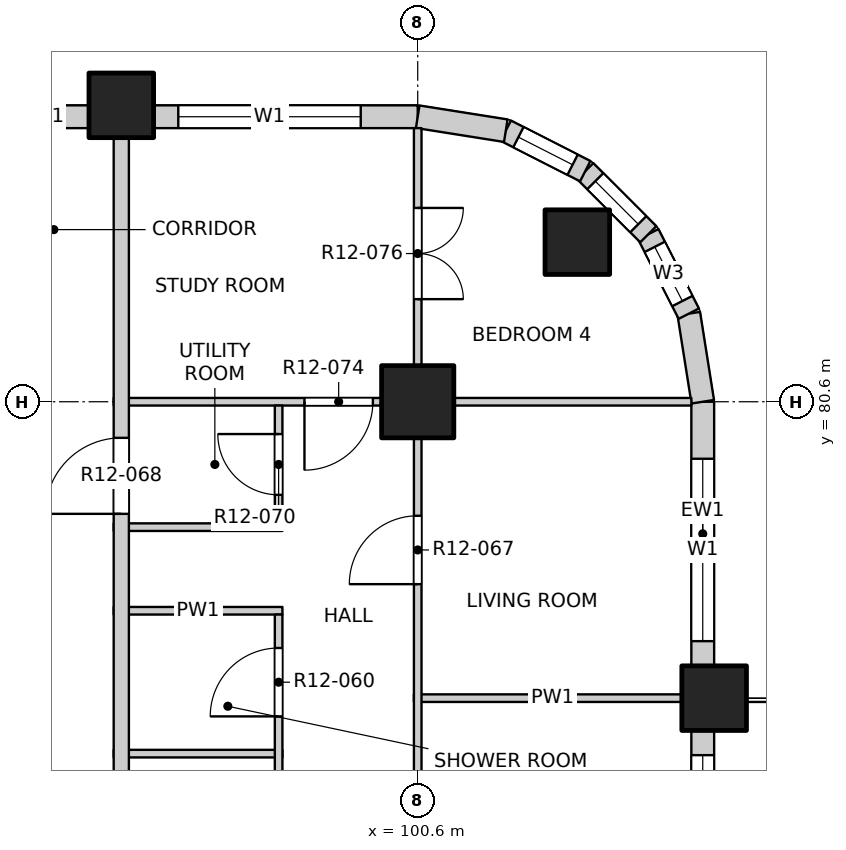
"""IFC4 building model, lengths in metres.
Left out: names, types, materials, properties, quantities, classifications, styles, units other than length and angle.
Written with IfcOpenShell. Run it as: python <this file> out.ifc"""

import sys

from ifc_helpers import new_model, si_unit, direction, frame, frame_2d, origin, origin_2d, place, context, subcontext, project, spatial, rectangle, extrude, element, fill, save


model = new_model("IFC4")
c1 = context("Model", 3, precision=1e-05, world=origin(), true_north=direction((0.0, 1.0)))
c2 = subcontext(c1, "Body", "Model", "MODEL_VIEW")
j1 = project(units=[si_unit("LENGTHUNIT", "METRE"), si_unit("PLANEANGLEUNIT", "RADIAN")], contexts=[c1])
p1 = place(None, origin())
s1 = spatial("IfcSite", under=j1, at=p1, CompositionType="ELEMENT")
p2 = place(p1, origin())
s2 = spatial("IfcBuilding", under=s1, at=p2, CompositionType="ELEMENT")
p3 = place(p2, frame((0.0, 0.0, 137.3)))
s3 = spatial("IfcBuildingStorey", under=s2, at=p3, CompositionType="ELEMENT", Elevation=137.3)
for number, where, z_axis, x_axis in (
    (1, (102.7, 82.7, -0.25), (0.0, 0.0, 1.0), (1.0, 0.0, 0.0)),
    (2, (104.5, 76.7, -0.25), (0.0, 0.0, 1.0), (1.0, 0.0, 0.0)),
    (3, (96.7, 84.5, -0.25), (0.0, 0.0, 1.0), (1.0, 0.0, 0.0)),
):
    element("IfcColumn", number, at=place(p3, frame(where, z_axis=z_axis, x_axis=x_axis)), inside=s3, PredefinedType="COLUMN", context=c2, shape_type="SweptSolid", body=[
        extrude(rectangle(XDim=0.85, YDim=0.85, at=origin_2d()), origin(), (0.0, 0.0, 1.0), 3.4),
    ])
p4 = place(p3, frame((100.6, 80.6, -0.25), z_axis=(0.0, 0.0, 1.0), x_axis=(1.0, 0.0, 0.0)))
e4 = element("IfcColumn", 4, at=p4, inside=s3, PredefinedType="COLUMN", context=c2, shape_type="SweptSolid", body=[
    extrude(rectangle(XDim=0.95, YDim=0.95, at=origin_2d()), origin(), (0.0, 0.0, 1.0), 3.4),
])
p5 = place(p3, frame((104.35, 69.325, 0.0), z_axis=(0.0, 0.0, 1.0), x_axis=(0.0, 1.0, 0.0)))
e5 = element("IfcWall", 5, at=p5, inside=s3, PredefinedType="SOLIDWALL", context=c2, shape_type="SweptSolid", body=[
    extrude(rectangle(XDim=6.95, YDim=0.3, at=frame_2d((3.475, 0.0))), origin(), (0.0, 0.0, 1.0), 2.7),
])
p6 = place(p5, frame((0.625, 0.0, 0.0)))
e6 = element("IfcOpeningElement", 6, at=p6, cuts=e5, PredefinedType="OPENING", context=c2, shape_type="SweptSolid", body=[
    extrude(rectangle(XDim=1.8, YDim=2.4, at=frame_2d((0.9, 1.2))), frame((0.0, 0.16, 0.0), z_axis=(0.0, -1.0, 0.0), x_axis=(1.0, 0.0, 0.0)), (0.0, 0.0, 1.0), 0.32),
])
p7 = place(p5, frame((4.225, 0.0, 0.9)))
e7 = element("IfcOpeningElement", 7, at=p7, cuts=e5, PredefinedType="OPENING", context=c2, shape_type="SweptSolid", body=[
    extrude(rectangle(XDim=2.4, YDim=1.8, at=frame_2d((1.2, 0.9))), frame((0.0, 0.16, 0.0), z_axis=(0.0, -1.0, 0.0), x_axis=(1.0, 0.0, 0.0)), (0.0, 0.0, 1.0), 0.32),
])
p8 = place(p3, frame((104.35, 77.125, 0.0), z_axis=(0.0, 0.0, 1.0), x_axis=(0.0, 1.0, 0.0)))
e8 = element("IfcWall", 8, at=p8, inside=s3, PredefinedType="SOLIDWALL", context=c2, shape_type="SweptSolid", body=[
    extrude(rectangle(XDim=3.475, YDim=0.3, at=frame_2d((1.738, 0.0))), origin(), (0.0, 0.0, 1.0), 2.7),
])
p9 = place(p8, frame((0.325, 0.0, 0.9)))
e9 = element("IfcOpeningElement", 9, at=p9, cuts=e8, PredefinedType="OPENING", context=c2, shape_type="SweptSolid", body=[
    extrude(rectangle(XDim=2.4, YDim=1.8, at=frame_2d((1.2, 0.9))), frame((0.0, 0.16, 0.0), z_axis=(0.0, -1.0, 0.0), x_axis=(1.0, 0.0, 0.0)), (0.0, 0.0, 1.0), 0.32),
])
p10 = place(p3, frame((95.025, 84.35, 0.0), z_axis=(0.0, 0.0, 1.0), x_axis=(1.0, 0.0, 0.0)))
e10 = element("IfcWall", 10, at=p10, inside=s3, PredefinedType="SOLIDWALL", context=c2, shape_type="SweptSolid", body=[
    extrude(rectangle(XDim=1.25, YDim=0.3, at=frame_2d((0.625, 0.0))), origin(), (0.0, 0.0, 1.0), 2.7),
])
p11 = place(p3, frame((97.125, 84.35, 0.0), z_axis=(0.0, 0.0, 1.0), x_axis=(1.0, 0.0, 0.0)))
e11 = element("IfcWall", 11, at=p11, inside=s3, PredefinedType="SOLIDWALL", context=c2, shape_type="SweptSolid", body=[
    extrude(rectangle(XDim=3.475, YDim=0.3, at=frame_2d((1.738, 0.0))), origin(), (0.0, 0.0, 1.0), 2.7),
])
p12 = place(p11, frame((0.325, 0.0, 0.9)))
e12 = element("IfcOpeningElement", 12, at=p12, cuts=e11, PredefinedType="OPENING", context=c2, shape_type="SweptSolid", body=[
    extrude(rectangle(XDim=2.4, YDim=1.8, at=frame_2d((1.2, 0.9))), frame((0.0, 0.16, 0.0), z_axis=(0.0, -1.0, 0.0), x_axis=(1.0, 0.0, 0.0)), (0.0, 0.0, 1.0), 0.32),
])
p13 = place(p3, frame((104.35, 80.6, 0.0), z_axis=(0.0, 0.0, 1.0), x_axis=(-0.156496880861, 0.987678452879, 0.0)))
e13 = element("IfcWall", 13, at=p13, inside=s3, PredefinedType="SOLIDWALL", context=c2, shape_type="SweptSolid", body=[
    extrude(rectangle(XDim=1.173, YDim=0.3, at=frame_2d((0.586, 0.0))), origin(), (0.0, 0.0, 1.0), 2.7),
])
p14 = place(p3, frame((104.167, 81.759, 0.0), z_axis=(0.0, 0.0, 1.0), x_axis=(-0.454025524128, 0.890988677504, 0.0)))
e14 = element("IfcWall", 14, at=p14, inside=s3, PredefinedType="SOLIDWALL", context=c2, shape_type="SweptSolid", body=[
    extrude(rectangle(XDim=1.173, YDim=0.3, at=frame_2d((0.587, 0.0))), origin(), (0.0, 0.0, 1.0), 2.7),
])
p15 = place(p14, frame((0.187, 0.0, 0.9)))
e15 = element("IfcOpeningElement", 15, at=p15, cuts=e14, PredefinedType="OPENING", context=c2, shape_type="SweptSolid", body=[
    extrude(rectangle(XDim=0.8, YDim=1.2, at=frame_2d((0.4, 0.6))), frame((0.0, 0.16, 0.0), z_axis=(0.0, -1.0, 0.0), x_axis=(1.0, 0.0, 0.0)), (0.0, 0.0, 1.0), 0.32),
])
p16 = place(p3, frame((103.634, 82.804, 0.0), z_axis=(0.0, 0.0, 1.0), x_axis=(-0.707106781187, 0.707106781187, 0.0)))
e16 = element("IfcWall", 16, at=p16, inside=s3, PredefinedType="SOLIDWALL", context=c2, shape_type="SweptSolid", body=[
    extrude(rectangle(XDim=1.173, YDim=0.3, at=frame_2d((0.586, 0.0))), origin(), (0.0, 0.0, 1.0), 2.7),
])
p17 = place(p16, frame((0.187, 0.0, 0.9)))
e17 = element("IfcOpeningElement", 17, at=p17, cuts=e16, PredefinedType="OPENING", context=c2, shape_type="SweptSolid", body=[
    extrude(rectangle(XDim=0.8, YDim=1.2, at=frame_2d((0.4, 0.6))), frame((0.0, 0.16, 0.0), z_axis=(0.0, -1.0, 0.0), x_axis=(1.0, 0.0, 0.0)), (0.0, 0.0, 1.0), 0.32),
])
p18 = place(p3, frame((102.804, 83.634, 0.0), z_axis=(0.0, 0.0, 1.0), x_axis=(-0.890988677504, 0.454025524128, 0.0)))
e18 = element("IfcWall", 18, at=p18, inside=s3, PredefinedType="SOLIDWALL", context=c2, shape_type="SweptSolid", body=[
    extrude(rectangle(XDim=1.173, YDim=0.3, at=frame_2d((0.587, 0.0))), origin(), (0.0, 0.0, 1.0), 2.7),
])
p19 = place(p18, frame((0.187, 0.0, 0.9)))
e19 = element("IfcOpeningElement", 19, at=p19, cuts=e18, PredefinedType="OPENING", context=c2, shape_type="SweptSolid", body=[
    extrude(rectangle(XDim=0.8, YDim=1.2, at=frame_2d((0.4, 0.6))), frame((0.0, 0.16, 0.0), z_axis=(0.0, -1.0, 0.0), x_axis=(1.0, 0.0, 0.0)), (0.0, 0.0, 1.0), 0.32),
])
p20 = place(p3, frame((101.759, 84.167, 0.0), z_axis=(0.0, 0.0, 1.0), x_axis=(-0.987678452879, 0.156496880861, 0.0)))
e20 = element("IfcWall", 20, at=p20, inside=s3, PredefinedType="SOLIDWALL", context=c2, shape_type="SweptSolid", body=[
    extrude(rectangle(XDim=1.173, YDim=0.3, at=frame_2d((0.586, 0.0))), origin(), (0.0, 0.0, 1.0), 2.7),
])
p21 = place(p3, frame((96.6, 75.97, 0.0), z_axis=(0.0, 0.0, 1.0), x_axis=(1.0, 0.0, 0.0)))
e21 = element("IfcWall", 21, at=p21, inside=s3, PredefinedType="PARTITIONING", context=c2, shape_type="SweptSolid", body=[
    extrude(rectangle(XDim=2.22, YDim=0.1, at=frame_2d((1.11, 0.0))), origin(), (0.0, 0.0, 1.0), 3.15),
])
p22 = place(p3, frame((100.55, 76.7, 0.0), z_axis=(0.0, 0.0, 1.0), x_axis=(1.0, 0.0, 0.0)))
e22 = element("IfcWall", 22, at=p22, inside=s3, PredefinedType="PARTITIONING", context=c2, shape_type="SweptSolid", body=[
    extrude(rectangle(XDim=3.65, YDim=0.1, at=frame_2d((1.825, 0.0))), origin(), (0.0, 0.0, 1.0), 2.55),
])
for number, where, z_axis, x_axis in (
    (23, (96.6, 77.85, 0.0), (0.0, 0.0, 1.0), (1.0, 0.0, 0.0)),
    (24, (96.6, 78.95, 0.0), (0.0, 0.0, 1.0), (1.0, 0.0, 0.0)),
):
    element("IfcWall", number, at=place(p3, frame(where, z_axis=z_axis, x_axis=x_axis)), inside=s3, PredefinedType="PARTITIONING", context=c2, shape_type="SweptSolid", body=[
        extrude(rectangle(XDim=2.22, YDim=0.1, at=frame_2d((1.11, 0.0))), origin(), (0.0, 0.0, 1.0), 3.15),
    ])
p23 = place(p3, frame((96.6, 80.6, 0.0), z_axis=(0.0, 0.0, 1.0), x_axis=(1.0, 0.0, 0.0)))
e25 = element("IfcWall", 25, at=p23, inside=s3, PredefinedType="PARTITIONING", context=c2, shape_type="SweptSolid", body=[
    extrude(rectangle(XDim=7.6, YDim=0.1, at=frame_2d((3.8, 0.0))), origin(), (0.0, 0.0, 1.0), 3.15),
])
p24 = place(p23, frame((2.51, 0.0, 0.0)))
e26 = element("IfcOpeningElement", 26, at=p24, cuts=e25, PredefinedType="OPENING", context=c2, shape_type="SweptSolid", body=[
    extrude(rectangle(XDim=0.9, YDim=2.1, at=frame_2d((0.45, 1.05))), frame((0.0, 0.06, 0.0), z_axis=(0.0, -1.0, 0.0), x_axis=(1.0, 0.0, 0.0)), (0.0, 0.0, 1.0), 0.12),
])
p25 = place(p3, frame((96.7, 49.5, 0.0), z_axis=(0.0, 0.0, 1.0), x_axis=(0.0, 1.0, 0.0)))
e27 = element("IfcWall", 27, at=p25, inside=s3, PredefinedType="PARTITIONING", context=c2, shape_type="SweptSolid", body=[
    extrude(rectangle(XDim=34.7, YDim=0.2, at=frame_2d((17.35, 0.0))), origin(), (0.0, 0.0, 1.0), 3.15),
])
p26 = place(p25, frame((13.325, 0.0, 0.0)))
e28 = element("IfcOpeningElement", 28, at=p26, cuts=e27, PredefinedType="OPENING", context=c2, shape_type="SweptSolid", body=[
    extrude(rectangle(XDim=1.0, YDim=2.1, at=frame_2d((0.5, 1.05))), frame((0.0, 0.11, 0.0), z_axis=(0.0, -1.0, 0.0), x_axis=(1.0, 0.0, 0.0)), (0.0, 0.0, 1.0), 0.22),
])
p27 = place(p25, frame((29.625, 0.0, 0.0)))
e29 = element("IfcOpeningElement", 29, at=p27, cuts=e27, PredefinedType="OPENING", context=c2, shape_type="SweptSolid", body=[
    extrude(rectangle(XDim=1.0, YDim=2.1, at=frame_2d((0.5, 1.05))), frame((0.0, 0.11, 0.0), z_axis=(0.0, -1.0, 0.0), x_axis=(1.0, 0.0, 0.0)), (0.0, 0.0, 1.0), 0.22),
])
p28 = place(p3, frame((98.77, 62.7, 0.0), z_axis=(0.0, 0.0, 1.0), x_axis=(0.0, 1.0, 0.0)))
e30 = element("IfcWall", 30, at=p28, inside=s3, PredefinedType="PARTITIONING", context=c2, shape_type="SweptSolid", body=[
    extrude(rectangle(XDim=15.1, YDim=0.1, at=frame_2d((7.55, 0.0))), origin(), (0.0, 0.0, 1.0), 3.15),
])
p29 = place(p28, frame((0.675, 0.0, 0.0)))
e31 = element("IfcOpeningElement", 31, at=p29, cuts=e30, PredefinedType="OPENING", context=c2, shape_type="SweptSolid", body=[
    extrude(rectangle(XDim=0.9, YDim=2.1, at=frame_2d((0.45, 1.05))), frame((0.0, 0.06, 0.0), z_axis=(0.0, -1.0, 0.0), x_axis=(1.0, 0.0, 0.0)), (0.0, 0.0, 1.0), 0.12),
])
p30 = place(p28, frame((3.46, 0.0, 0.0)))
e32 = element("IfcOpeningElement", 32, at=p30, cuts=e30, PredefinedType="OPENING", context=c2, shape_type="SweptSolid", body=[
    extrude(rectangle(XDim=0.9, YDim=2.1, at=frame_2d((0.45, 1.05))), frame((0.0, 0.06, 0.0), z_axis=(0.0, -1.0, 0.0), x_axis=(1.0, 0.0, 0.0)), (0.0, 0.0, 1.0), 0.12),
])
p31 = place(p28, frame((6.27, 0.0, 0.0)))
e33 = element("IfcOpeningElement", 33, at=p31, cuts=e30, PredefinedType="OPENING", context=c2, shape_type="SweptSolid", body=[
    extrude(rectangle(XDim=0.9, YDim=2.1, at=frame_2d((0.45, 1.05))), frame((0.0, 0.06, 0.0), z_axis=(0.0, -1.0, 0.0), x_axis=(1.0, 0.0, 0.0)), (0.0, 0.0, 1.0), 0.12),
])
p32 = place(p28, frame((8.895, 0.0, 0.0)))
e34 = element("IfcOpeningElement", 34, at=p32, cuts=e30, PredefinedType="OPENING", context=c2, shape_type="SweptSolid", body=[
    extrude(rectangle(XDim=0.8, YDim=2.1, at=frame_2d((0.4, 1.05))), frame((0.0, 0.06, 0.0), z_axis=(0.0, -1.0, 0.0), x_axis=(1.0, 0.0, 0.0)), (0.0, 0.0, 1.0), 0.12),
])
p33 = place(p28, frame((11.57, 0.0, 0.0)))
e35 = element("IfcOpeningElement", 35, at=p33, cuts=e30, PredefinedType="OPENING", context=c2, shape_type="SweptSolid", body=[
    extrude(rectangle(XDim=0.8, YDim=2.1, at=frame_2d((0.4, 1.05))), frame((0.0, 0.06, 0.0), z_axis=(0.0, -1.0, 0.0), x_axis=(1.0, 0.0, 0.0)), (0.0, 0.0, 1.0), 0.12),
])
p34 = place(p28, frame((13.76, 0.0, 0.0)))
e36 = element("IfcOpeningElement", 36, at=p34, cuts=e30, PredefinedType="OPENING", context=c2, shape_type="SweptSolid", body=[
    extrude(rectangle(XDim=0.9, YDim=2.1, at=frame_2d((0.45, 1.05))), frame((0.0, 0.06, 0.0), z_axis=(0.0, -1.0, 0.0), x_axis=(1.0, 0.0, 0.0)), (0.0, 0.0, 1.0), 0.12),
])
p35 = place(p3, frame((98.77, 79.0, 0.0), z_axis=(0.0, 0.0, 1.0), x_axis=(0.0, 1.0, 0.0)))
e37 = element("IfcWall", 37, at=p35, inside=s3, PredefinedType="PARTITIONING", context=c2, shape_type="SweptSolid", body=[
    extrude(rectangle(XDim=1.55, YDim=0.1, at=frame_2d((0.775, 0.0))), origin(), (0.0, 0.0, 1.0), 3.15),
])
p36 = place(p35, frame((0.375, 0.0, 0.0)))
e38 = element("IfcOpeningElement", 38, at=p36, cuts=e37, PredefinedType="OPENING", context=c2, shape_type="SweptSolid", body=[
    extrude(rectangle(XDim=0.8, YDim=2.1, at=frame_2d((0.4, 1.05))), frame((0.0, 0.06, 0.0), z_axis=(0.0, -1.0, 0.0), x_axis=(1.0, 0.0, 0.0)), (0.0, 0.0, 1.0), 0.12),
])
p37 = place(p3, frame((100.6, 45.8, 0.0), z_axis=(0.0, 0.0, 1.0), x_axis=(0.0, 1.0, 0.0)))
e39 = element("IfcWall", 39, at=p37, inside=s3, PredefinedType="PARTITIONING", context=c2, shape_type="SweptSolid", body=[
    extrude(rectangle(XDim=38.4, YDim=0.1, at=frame_2d((19.2, 0.0))), origin(), (0.0, 0.0, 1.0), 3.15),
])
p38 = place(p37, frame((1.05, 0.0, 0.0)))
e40 = element("IfcOpeningElement", 40, at=p38, cuts=e39, PredefinedType="OPENING", context=c2, shape_type="SweptSolid", body=[
    extrude(rectangle(XDim=1.2, YDim=2.1, at=frame_2d((0.6, 1.05))), frame((0.0, 0.06, 0.0), z_axis=(0.0, -1.0, 0.0), x_axis=(1.0, 0.0, 0.0)), (0.0, 0.0, 1.0), 0.12),
])
p39 = place(p37, frame((5.1, 0.0, 0.0)))
e41 = element("IfcOpeningElement", 41, at=p39, cuts=e39, PredefinedType="OPENING", context=c2, shape_type="SweptSolid", body=[
    extrude(rectangle(XDim=0.9, YDim=2.1, at=frame_2d((0.45, 1.05))), frame((0.0, 0.06, 0.0), z_axis=(0.0, -1.0, 0.0), x_axis=(1.0, 0.0, 0.0)), (0.0, 0.0, 1.0), 0.12),
])
p40 = place(p37, frame((9.0, 0.0, 0.0)))
e42 = element("IfcOpeningElement", 42, at=p40, cuts=e39, PredefinedType="OPENING", context=c2, shape_type="SweptSolid", body=[
    extrude(rectangle(XDim=0.9, YDim=2.1, at=frame_2d((0.45, 1.05))), frame((0.0, 0.06, 0.0), z_axis=(0.0, -1.0, 0.0), x_axis=(1.0, 0.0, 0.0)), (0.0, 0.0, 1.0), 0.12),
])
p41 = place(p37, frame((12.9, 0.0, 0.0)))
e43 = element("IfcOpeningElement", 43, at=p41, cuts=e39, PredefinedType="OPENING", context=c2, shape_type="SweptSolid", body=[
    extrude(rectangle(XDim=0.9, YDim=2.1, at=frame_2d((0.45, 1.05))), frame((0.0, 0.06, 0.0), z_axis=(0.0, -1.0, 0.0), x_axis=(1.0, 0.0, 0.0)), (0.0, 0.0, 1.0), 0.12),
])
p42 = place(p37, frame((16.8, 0.0, 0.0)))
e44 = element("IfcOpeningElement", 44, at=p42, cuts=e39, PredefinedType="OPENING", context=c2, shape_type="SweptSolid", body=[
    extrude(rectangle(XDim=0.9, YDim=2.1, at=frame_2d((0.45, 1.05))), frame((0.0, 0.06, 0.0), z_axis=(0.0, -1.0, 0.0), x_axis=(1.0, 0.0, 0.0)), (0.0, 0.0, 1.0), 0.12),
])
p43 = place(p37, frame((20.7, 0.0, 0.0)))
e45 = element("IfcOpeningElement", 45, at=p43, cuts=e39, PredefinedType="OPENING", context=c2, shape_type="SweptSolid", body=[
    extrude(rectangle(XDim=0.9, YDim=2.1, at=frame_2d((0.45, 1.05))), frame((0.0, 0.06, 0.0), z_axis=(0.0, -1.0, 0.0), x_axis=(1.0, 0.0, 0.0)), (0.0, 0.0, 1.0), 0.12),
])
p44 = place(p37, frame((24.6, 0.0, 0.0)))
e46 = element("IfcOpeningElement", 46, at=p44, cuts=e39, PredefinedType="OPENING", context=c2, shape_type="SweptSolid", body=[
    extrude(rectangle(XDim=0.9, YDim=2.1, at=frame_2d((0.45, 1.05))), frame((0.0, 0.06, 0.0), z_axis=(0.0, -1.0, 0.0), x_axis=(1.0, 0.0, 0.0)), (0.0, 0.0, 1.0), 0.12),
])
p45 = place(p37, frame((28.5, 0.0, 0.0)))
e47 = element("IfcOpeningElement", 47, at=p45, cuts=e39, PredefinedType="OPENING", context=c2, shape_type="SweptSolid", body=[
    extrude(rectangle(XDim=0.9, YDim=2.1, at=frame_2d((0.45, 1.05))), frame((0.0, 0.06, 0.0), z_axis=(0.0, -1.0, 0.0), x_axis=(1.0, 0.0, 0.0)), (0.0, 0.0, 1.0), 0.12),
])
p46 = place(p37, frame((32.4, 0.0, 0.0)))
e48 = element("IfcOpeningElement", 48, at=p46, cuts=e39, PredefinedType="OPENING", context=c2, shape_type="SweptSolid", body=[
    extrude(rectangle(XDim=0.9, YDim=2.1, at=frame_2d((0.45, 1.05))), frame((0.0, 0.06, 0.0), z_axis=(0.0, -1.0, 0.0), x_axis=(1.0, 0.0, 0.0)), (0.0, 0.0, 1.0), 0.12),
])
p47 = place(p37, frame((36.15, 0.0, 0.0)))
e49 = element("IfcOpeningElement", 49, at=p47, cuts=e39, PredefinedType="OPENING", context=c2, shape_type="SweptSolid", body=[
    extrude(rectangle(XDim=1.2, YDim=2.1, at=frame_2d((0.6, 1.05))), frame((0.0, 0.06, 0.0), z_axis=(0.0, -1.0, 0.0), x_axis=(1.0, 0.0, 0.0)), (0.0, 0.0, 1.0), 0.12),
])
p48 = place(p7, origin())
e50 = element("IfcWindow", 50, at=p48, inside=s3, PartitioningType="DOUBLE_PANEL_VERTICAL", PredefinedType="WINDOW", context=c2, shape_type="SweptSolid", body=[
    extrude(rectangle(XDim=2.4, YDim=1.8, at=frame_2d((1.2, 0.9))), frame((0.0, 0.03, 0.0), z_axis=(0.0, -1.0, 0.0), x_axis=(1.0, 0.0, 0.0)), (0.0, 0.0, 1.0), 0.06),
])
fill(e7, e50)
p49 = place(p9, origin())
e51 = element("IfcWindow", 51, at=p49, inside=s3, PartitioningType="DOUBLE_PANEL_VERTICAL", PredefinedType="WINDOW", context=c2, shape_type="SweptSolid", body=[
    extrude(rectangle(XDim=2.4, YDim=1.8, at=frame_2d((1.2, 0.9))), frame((0.0, 0.03, 0.0), z_axis=(0.0, -1.0, 0.0), x_axis=(1.0, 0.0, 0.0)), (0.0, 0.0, 1.0), 0.06),
])
fill(e9, e51)
p50 = place(p12, origin())
e52 = element("IfcWindow", 52, at=p50, inside=s3, PartitioningType="DOUBLE_PANEL_VERTICAL", PredefinedType="WINDOW", context=c2, shape_type="SweptSolid", body=[
    extrude(rectangle(XDim=2.4, YDim=1.8, at=frame_2d((1.2, 0.9))), frame((0.0, 0.03, 0.0), z_axis=(0.0, -1.0, 0.0), x_axis=(1.0, 0.0, 0.0)), (0.0, 0.0, 1.0), 0.06),
])
fill(e12, e52)
p51 = place(p15, origin())
e53 = element("IfcWindow", 53, at=p51, inside=s3, PartitioningType="SINGLE_PANEL", PredefinedType="WINDOW", context=c2, shape_type="SweptSolid", body=[
    extrude(rectangle(XDim=0.8, YDim=1.2, at=frame_2d((0.4, 0.6))), frame((0.0, 0.03, 0.0), z_axis=(0.0, -1.0, 0.0), x_axis=(1.0, 0.0, 0.0)), (0.0, 0.0, 1.0), 0.06),
])
fill(e15, e53)
p52 = place(p17, origin())
e54 = element("IfcWindow", 54, at=p52, inside=s3, PartitioningType="SINGLE_PANEL", PredefinedType="WINDOW", context=c2, shape_type="SweptSolid", body=[
    extrude(rectangle(XDim=0.8, YDim=1.2, at=frame_2d((0.4, 0.6))), frame((0.0, 0.03, 0.0), z_axis=(0.0, -1.0, 0.0), x_axis=(1.0, 0.0, 0.0)), (0.0, 0.0, 1.0), 0.06),
])
fill(e17, e54)
p53 = place(p19, origin())
e55 = element("IfcWindow", 55, at=p53, inside=s3, PartitioningType="SINGLE_PANEL", PredefinedType="WINDOW", context=c2, shape_type="SweptSolid", body=[
    extrude(rectangle(XDim=0.8, YDim=1.2, at=frame_2d((0.4, 0.6))), frame((0.0, 0.03, 0.0), z_axis=(0.0, -1.0, 0.0), x_axis=(1.0, 0.0, 0.0)), (0.0, 0.0, 1.0), 0.06),
])
fill(e19, e55)
p54 = place(p34, origin())
e56 = element("IfcDoor", 56, at=p54, inside=s3, OperationType="SINGLE_SWING_LEFT", PredefinedType="DOOR", context=c2, shape_type="SweptSolid", body=[
    extrude(rectangle(XDim=0.9, YDim=2.1, at=frame_2d((0.45, 1.05))), frame((0.0, 0.025, 0.0), z_axis=(0.0, -1.0, 0.0), x_axis=(1.0, 0.0, 0.0)), (0.0, 0.0, 1.0), 0.05),
])
fill(e36, e56)
p55 = place(p46, origin())
e57 = element("IfcDoor", 57, at=p55, inside=s3, OperationType="SINGLE_SWING_LEFT", PredefinedType="DOOR", context=c2, shape_type="SweptSolid", body=[
    extrude(rectangle(XDim=0.9, YDim=2.1, at=frame_2d((0.45, 1.05))), frame((0.0, 0.025, 0.0), z_axis=(0.0, -1.0, 0.0), x_axis=(1.0, 0.0, 0.0)), (0.0, 0.0, 1.0), 0.05),
])
fill(e48, e57)
p56 = place(p27, origin())
e58 = element("IfcDoor", 58, at=p56, inside=s3, OperationType="SINGLE_SWING_LEFT", PredefinedType="DOOR", context=c2, shape_type="SweptSolid", body=[
    extrude(rectangle(XDim=1.0, YDim=2.1, at=frame_2d((0.5, 1.05))), frame((0.0, 0.025, 0.0), z_axis=(0.0, -1.0, 0.0), x_axis=(1.0, 0.0, 0.0)), (0.0, 0.0, 1.0), 0.05),
])
fill(e29, e58)
p57 = place(p36, origin())
e59 = element("IfcDoor", 59, at=p57, inside=s3, OperationType="SINGLE_SWING_RIGHT", PredefinedType="DOOR", context=c2, shape_type="SweptSolid", body=[
    extrude(rectangle(XDim=0.8, YDim=2.1, at=frame_2d((0.4, 1.05))), frame((0.0, 0.025, 0.0), z_axis=(0.0, -1.0, 0.0), x_axis=(1.0, 0.0, 0.0)), (0.0, 0.0, 1.0), 0.05),
])
fill(e38, e59)
p58 = place(p24, origin())
e60 = element("IfcDoor", 60, at=p58, inside=s3, OperationType="SINGLE_SWING_RIGHT", PredefinedType="DOOR", context=c2, shape_type="SweptSolid", body=[
    extrude(rectangle(XDim=0.9, YDim=2.1, at=frame_2d((0.45, 1.05))), frame((0.0, 0.025, 0.0), z_axis=(0.0, -1.0, 0.0), x_axis=(1.0, 0.0, 0.0)), (0.0, 0.0, 1.0), 0.05),
])
fill(e26, e60)
p59 = place(p47, origin())
e61 = element("IfcDoor", 61, at=p59, inside=s3, OperationType="DOUBLE_DOOR_SINGLE_SWING", PredefinedType="DOOR", context=c2, shape_type="SweptSolid", body=[
    extrude(rectangle(XDim=1.2, YDim=2.1, at=frame_2d((0.6, 1.05))), frame((0.0, 0.025, 0.0), z_axis=(0.0, -1.0, 0.0), x_axis=(1.0, 0.0, 0.0)), (0.0, 0.0, 1.0), 0.05),
])
fill(e49, e61)
save(model, sys.argv[1])
